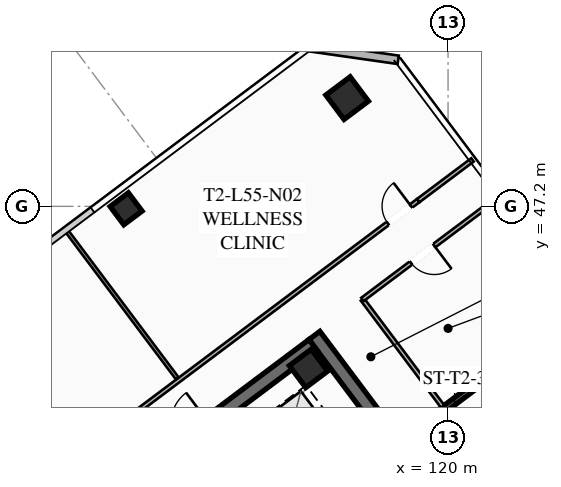
"""IFC4 building model, lengths in metres.
Left out: names, types, materials, properties, quantities, classifications, styles, units other than length and angle.
Written with IfcOpenShell. Run it as: python <this file> out.ifc"""

import sys

from ifc_helpers import new_model, si_unit, direction, frame, frame_2d, origin, origin_2d, place, context, subcontext, project, spatial, rectangle, hollow_rectangle, extrude, element, fill, save


model = new_model("IFC4")
c1 = context("Model", 3, precision=1e-05, world=origin(), true_north=direction((0.0, 1.0)))
c2 = subcontext(c1, "Body", "Model", "MODEL_VIEW")
j1 = project(units=[si_unit("LENGTHUNIT", "METRE"), si_unit("PLANEANGLEUNIT", "RADIAN")], contexts=[c1])
p1 = place(None, origin())
s1 = spatial("IfcSite", under=j1, at=p1, CompositionType="ELEMENT")
p2 = place(p1, origin())
s2 = spatial("IfcBuilding", under=s1, at=p2, CompositionType="ELEMENT")
p3 = place(p2, frame((0.0, 0.0, 204.2)))
s3 = spatial("IfcBuildingStorey", under=s2, at=p3, CompositionType="ELEMENT", Elevation=204.2)
p4 = place(p3, frame((115.604, 42.953, 0.0), z_axis=(0.0, 0.0, 1.0), x_axis=(0.600005007985, -0.799996243986, 0.0)))
e1 = element("IfcWall", 1, at=p4, inside=s3, PredefinedType="SHEAR", context=c2, shape_type="SweptSolid", body=[
    extrude(rectangle(XDim=15.6, YDim=0.45, at=frame_2d((7.8, 0.0))), origin(), (0.0, 0.0, 1.0), 3.55),
])
p5 = place(p3, frame((103.351, 33.482, 0.0), z_axis=(0.0, 0.0, 1.0), x_axis=(0.8, 0.6, 0.0)))
e2 = element("IfcWall", 2, at=p5, inside=s3, PredefinedType="SHEAR", context=c2, shape_type="SweptSolid", body=[
    extrude(rectangle(XDim=15.26, YDim=0.45, at=frame_2d((7.63, 0.0))), origin(), (0.0, 0.0, 1.0), 3.55),
])
p6 = place(p5, frame((4.68, 0.0, 0.0)))
e3 = element("IfcOpeningElement", 3, at=p6, cuts=e2, PredefinedType="OPENING", context=c2, shape_type="SweptSolid", body=[
    extrude(rectangle(XDim=1.25, YDim=2.25, at=frame_2d((0.625, 1.125))), frame((0.0, 0.235, 0.0), z_axis=(0.0, -1.0, 0.0), x_axis=(1.0, 0.0, 0.0)), (0.0, 0.0, 1.0), 0.47),
])
p7 = place(p5, frame((9.73, 0.0, 0.0)))
e4 = element("IfcOpeningElement", 4, at=p7, cuts=e2, PredefinedType="OPENING", context=c2, shape_type="SweptSolid", body=[
    extrude(rectangle(XDim=1.25, YDim=2.25, at=frame_2d((0.625, 1.125))), frame((0.0, 0.235, 0.0), z_axis=(0.0, -1.0, 0.0), x_axis=(1.0, 0.0, 0.0)), (0.0, 0.0, 1.0), 0.47),
])
p8 = place(p3, frame((115.41, 41.87, 0.0), z_axis=(0.0, 0.0, 1.0), x_axis=(0.799999996291, 0.600000004945, 0.0)))
e5 = element("IfcColumn", 5, at=p8, inside=s3, PredefinedType="COLUMN", context=c2, shape_type="SweptSolid", body=[
    extrude(hollow_rectangle(XDim=0.9, YDim=0.9, WallThickness=0.04, at=origin_2d()), origin(), (0.0, 0.0, 1.0), 3.37),
])
p9 = place(p3, frame((116.68, 50.76, 0.0), z_axis=(0.0, 0.0, 1.0), x_axis=(0.799999996291, 0.600000004945, 0.0)))
e6 = element("IfcColumn", 6, at=p9, inside=s3, PredefinedType="COLUMN", context=c2, shape_type="SweptSolid", body=[
    extrude(hollow_rectangle(XDim=1.0, YDim=1.0, WallThickness=0.04, at=origin_2d()), origin(), (0.0, 0.0, 1.0), 3.37),
])
p10 = place(p3, frame((109.41, 47.12, 0.0), z_axis=(0.0, 0.0, 1.0), x_axis=(0.799999996291, 0.600000004945, 0.0)))
e7 = element("IfcColumn", 7, at=p10, inside=s3, PredefinedType="COLUMN", context=c2, shape_type="SweptSolid", body=[
    extrude(hollow_rectangle(XDim=0.75, YDim=0.75, WallThickness=0.032, at=origin_2d()), origin(), (0.0, 0.0, 1.0), 3.37),
])
p11 = place(p3, frame((115.42, 52.44, 0.0), z_axis=(0.0, 0.0, 1.0), x_axis=(0.989954425158, -0.14138683146, 0.0)))
e8 = element("IfcWall", 8, at=p11, inside=s3, PredefinedType="SOLIDWALL", context=c2, shape_type="SweptSolid", body=[
    extrude(rectangle(XDim=2.97, YDim=0.28, at=frame_2d((1.485, 0.0))), origin(), (0.0, 0.0, 1.0), 3.37),
])
p12 = place(p3, frame((121.204, 41.528, 0.0), z_axis=(0.0, 0.0, 1.0), x_axis=(-0.800017232136, -0.599977023131, 0.0)))
e9 = element("IfcWall", 9, at=p12, inside=s3, PredefinedType="SHEAR", context=c2, shape_type="SweptSolid", body=[
    extrude(rectangle(XDim=3.4, YDim=0.2, at=frame_2d((1.7, 0.0))), origin(), (0.0, 0.0, 1.0), 3.37),
])
p13 = place(p12, frame((1.975, 0.0, 0.0)))
e10 = element("IfcOpeningElement", 10, at=p13, cuts=e9, PredefinedType="OPENING", context=c2, shape_type="SweptSolid", body=[
    extrude(rectangle(XDim=1.15, YDim=2.2, at=frame_2d((0.575, 1.1))), frame((0.0, 0.11, 0.0), z_axis=(0.0, -1.0, 0.0), x_axis=(1.0, 0.0, 0.0)), (0.0, 0.0, 1.0), 0.22),
])
p14 = place(p3, frame((119.824, 40.618, 0.0), z_axis=(0.0, 0.0, 1.0), x_axis=(-0.599982243973, 0.800013316712, 0.0)))
e11 = element("IfcWall", 11, at=p14, inside=s3, PredefinedType="PARTITIONING", context=c2, shape_type="SweptSolid", body=[
    extrude(rectangle(XDim=4.4, YDim=0.135, at=frame_2d((2.2, 0.0))), origin(), (0.0, 0.0, 1.0), 2.723),
])
p15 = place(p3, frame((100.756, 33.692, 0.0), z_axis=(0.0, 0.0, 1.0), x_axis=(0.799998716732, 0.60000171102, 0.0)))
e12 = element("IfcWall", 12, at=p15, inside=s3, PredefinedType="PARTITIONING", context=c2, shape_type="SweptSolid", body=[
    extrude(rectangle(XDim=22.83, YDim=0.135, at=frame_2d((11.415, 0.0))), origin(), (0.0, 0.0, 1.0), 2.723),
])
p16 = place(p15, frame((9.38, 0.0, 0.0)))
e13 = element("IfcOpeningElement", 13, at=p16, cuts=e12, PredefinedType="OPENING", context=c2, shape_type="SweptSolid", body=[
    extrude(rectangle(XDim=0.95, YDim=2.05, at=frame_2d((0.475, 1.025))), frame((0.0, 0.077, 0.0), z_axis=(0.0, -1.0, 0.0), x_axis=(1.0, 0.0, 0.0)), (0.0, 0.0, 1.0), 0.155),
])
p17 = place(p15, frame((21.58, 0.0, 0.0)))
e14 = element("IfcOpeningElement", 14, at=p17, cuts=e12, PredefinedType="OPENING", context=c2, shape_type="SweptSolid", body=[
    extrude(rectangle(XDim=0.95, YDim=2.05, at=frame_2d((0.475, 1.025))), frame((0.0, 0.077, 0.0), z_axis=(0.0, -1.0, 0.0), x_axis=(1.0, 0.0, 0.0)), (0.0, 0.0, 1.0), 0.155),
])
p18 = place(p3, frame((119.02, 47.39, 0.0), z_axis=(0.0, 0.0, 1.0), x_axis=(0.799960585956, 0.600052548463, 0.0)))
e15 = element("IfcWall", 15, at=p18, inside=s3, PredefinedType="PARTITIONING", context=c2, shape_type="SweptSolid", body=[
    extrude(rectangle(XDim=2.23, YDim=0.135, at=frame_2d((1.115, 0.0))), origin(), (0.0, 0.0, 1.0), 2.723),
])
p19 = place(p3, frame((111.092, 41.544, 0.0), z_axis=(0.0, 0.0, 1.0), x_axis=(-0.600006403464, 0.799995197362, 0.0)))
e16 = element("IfcWall", 16, at=p19, inside=s3, PredefinedType="PARTITIONING", context=c2, shape_type="SweptSolid", body=[
    extrude(rectangle(XDim=6.1, YDim=0.11, at=frame_2d((3.05, 0.0))), origin(), (0.0, 0.0, 1.0), 2.723),
])
p20 = place(p3, frame((121.704, 47.528, 0.0), z_axis=(0.0, 0.0, 1.0), x_axis=(-0.799989629485, -0.600013827105, 0.0)))
e17 = element("IfcWall", 17, at=p20, inside=s3, PredefinedType="PARTITIONING", context=c2, shape_type="SweptSolid", body=[
    extrude(rectangle(XDim=5.65, YDim=0.135, at=frame_2d((2.825, 0.0))), origin(), (0.0, 0.0, 1.0), 2.723),
])
p21 = place(p20, frame((2.7, 0.0, 0.0)))
e18 = element("IfcOpeningElement", 18, at=p21, cuts=e17, PredefinedType="OPENING", context=c2, shape_type="SweptSolid", body=[
    extrude(rectangle(XDim=0.95, YDim=2.05, at=frame_2d((0.475, 1.025))), frame((0.0, 0.077, 0.0), z_axis=(0.0, -1.0, 0.0), x_axis=(1.0, 0.0, 0.0)), (0.0, 0.0, 1.0), 0.155),
])
p22 = place(p17, origin())
e19 = element("IfcDoor", 19, at=p22, inside=s3, OperationType="SINGLE_SWING_RIGHT", PredefinedType="DOOR", context=c2, shape_type="SweptSolid", body=[
    extrude(rectangle(XDim=0.95, YDim=2.05, at=frame_2d((0.475, 1.025))), frame((0.0, 0.025, 0.0), z_axis=(0.0, -1.0, 0.0), x_axis=(1.0, 0.0, 0.0)), (0.0, 0.0, 1.0), 0.05),
])
fill(e14, e19)
p23 = place(p21, origin())
e20 = element("IfcDoor", 20, at=p23, inside=s3, OperationType="SINGLE_SWING_LEFT", PredefinedType="DOOR", context=c2, shape_type="SweptSolid", body=[
    extrude(rectangle(XDim=0.95, YDim=2.05, at=frame_2d((0.475, 1.025))), frame((0.0, 0.025, 0.0), z_axis=(0.0, -1.0, 0.0), x_axis=(1.0, 0.0, 0.0)), (0.0, 0.0, 1.0), 0.05),
])
fill(e18, e20)
save(model, sys.argv[1])
